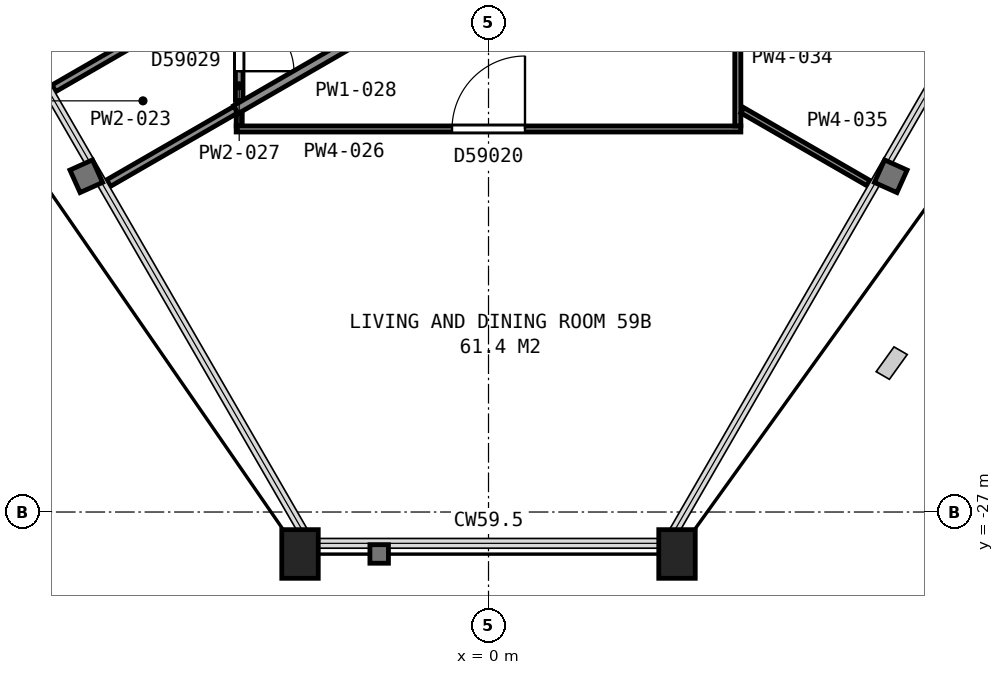
"""IFC4 building model, lengths in metres.
Left out: names, types, materials, properties, quantities, classifications, styles, units other than length and angle.
Written with IfcOpenShell. Run it as: python <this file> out.ifc"""

import sys

from ifc_helpers import new_model, si_unit, direction, frame, frame_2d, origin, origin_2d, place, context, subcontext, project, spatial, rectangle, hollow_rectangle, extrude, element, fill, save


model = new_model("IFC4")
c1 = context("Model", 3, precision=1e-05, world=origin(), true_north=direction((0.0, 1.0)))
c2 = subcontext(c1, "Body", "Model", "MODEL_VIEW")
j1 = project(units=[si_unit("LENGTHUNIT", "METRE"), si_unit("PLANEANGLEUNIT", "RADIAN")], contexts=[c1])
p1 = place(None, origin())
s1 = spatial("IfcSite", under=j1, at=p1, CompositionType="ELEMENT")
p2 = place(p1, origin())
s2 = spatial("IfcBuilding", under=s1, at=p2, CompositionType="ELEMENT")
p3 = place(p2, frame((0.0, 0.0, 236.0)))
s3 = spatial("IfcBuildingStorey", under=s2, at=p3, CompositionType="ELEMENT", Elevation=236.0)
for number, where, z_axis, x_axis in (
    (1, (-3.1, -27.69, 0.065), (0.0, 0.0, 1.0), (-1.0, 0.0, 0.0)),
    (2, (3.1, -27.69, 0.065), (0.0, 0.0, 1.0), (-1.0, 0.0, 0.0)),
):
    element("IfcColumn", number, at=place(p3, frame(where, z_axis=z_axis, x_axis=x_axis)), inside=s3, PredefinedType="COLUMN", context=c2, shape_type="SweptSolid", body=[
        extrude(hollow_rectangle(XDim=0.6, YDim=0.8, WallThickness=0.05, at=origin_2d()), origin(), (0.0, 0.0, 1.0), 3.635),
    ])
p4 = place(p3, frame((-7.148, -20.031, 0.0), z_axis=(0.0, 0.0, 1.0), x_axis=(0.865978603381, 0.500081051916, 0.0)))
e3 = element("IfcWall", 3, at=p4, inside=s3, PredefinedType="PARTITIONING", context=c2, shape_type="SweptSolid", body=[
    extrude(rectangle(XDim=3.477, YDim=0.125, at=frame_2d((1.739, 0.0))), origin(), (0.0, 0.0, 1.0), 2.713),
])
p5 = place(p3, frame((-6.248, -21.59, 0.0), z_axis=(0.0, 0.0, 1.0), x_axis=(0.866059450854, 0.499941024108, 0.0)))
e4 = element("IfcWall", 4, at=p5, inside=s3, PredefinedType="PARTITIONING", context=c2, shape_type="SweptSolid", body=[
    extrude(rectangle(XDim=2.417, YDim=0.125, at=frame_2d((1.208, 0.0))), origin(), (0.0, 0.0, 1.0), 2.713),
])
p6 = place(p3, frame((-4.1, -20.65, 0.0), z_axis=(0.0, 0.0, 1.0), x_axis=(0.0, 1.0, 0.0)))
e5 = element("IfcWall", 5, at=p6, inside=s3, PredefinedType="PARTITIONING", context=c2, shape_type="SweptSolid", body=[
    extrude(rectangle(XDim=0.2, YDim=0.1, at=frame_2d((0.1, 0.0))), origin(), (0.0, 0.0, 1.0), 2.713),
])
p7 = place(p3, frame((4.15, -20.7, 0.0), z_axis=(0.0, 0.0, 1.0), x_axis=(-1.0, 0.0, 0.0)))
e6 = element("IfcWall", 6, at=p7, inside=s3, PredefinedType="PARTITIONING", context=c2, shape_type="SweptSolid", body=[
    extrude(rectangle(XDim=8.3, YDim=0.1, at=frame_2d((4.15, 0.0))), origin(), (0.0, 0.0, 1.0), 2.713),
])
p8 = place(p7, frame((3.55, 0.0, 0.0)))
e7 = element("IfcOpeningElement", 7, at=p8, cuts=e6, PredefinedType="OPENING", context=c2, shape_type="SweptSolid", body=[
    extrude(rectangle(XDim=1.2, YDim=2.1, at=frame_2d((0.6, 1.05))), frame((0.0, 0.06, 0.0), z_axis=(0.0, -1.0, 0.0), x_axis=(1.0, 0.0, 0.0)), (0.0, 0.0, 1.0), 0.12),
])
p9 = place(p3, frame((-4.1, -18.376, 0.0), z_axis=(0.0, 0.0, 1.0), x_axis=(0.0, -1.0, 0.0)))
e8 = element("IfcWall", 8, at=p9, inside=s3, PredefinedType="PARTITIONING", context=c2, shape_type="SweptSolid", body=[
    extrude(rectangle(XDim=1.854, YDim=0.125, at=frame_2d((0.927, 0.0))), origin(), (0.0, 0.0, 1.0), 2.713),
])
p10 = place(p9, frame((0.474, 0.0, 0.0)))
e9 = element("IfcOpeningElement", 9, at=p10, cuts=e8, PredefinedType="OPENING", context=c2, shape_type="SweptSolid", body=[
    extrude(rectangle(XDim=0.9, YDim=2.1, at=frame_2d((0.45, 1.05))), frame((0.0, 0.073, 0.0), z_axis=(0.0, -1.0, 0.0), x_axis=(1.0, 0.0, 0.0)), (0.0, 0.0, 1.0), 0.145),
])
p11 = place(p3, frame((-4.154, -20.381, 0.0), z_axis=(0.0, 0.0, 1.0), x_axis=(0.86594123094, 0.500145763311, 0.0)))
e10 = element("IfcWall", 10, at=p11, inside=s3, PredefinedType="PARTITIONING", context=c2, shape_type="SweptSolid", body=[
    extrude(rectangle(XDim=2.962, YDim=0.15, at=frame_2d((1.481, 0.0))), origin(), (0.0, 0.0, 1.0), 2.713),
])
p12 = place(p3, frame((4.1, -15.539, 0.0), z_axis=(0.0, 0.0, 1.0), x_axis=(0.0, -1.0, 0.0)))
e11 = element("IfcWall", 11, at=p12, inside=s3, PredefinedType="PARTITIONING", context=c2, shape_type="SweptSolid", body=[
    extrude(rectangle(XDim=5.111, YDim=0.1, at=frame_2d((2.555, 0.0))), origin(), (0.0, 0.0, 1.0), 2.713),
])
p13 = place(p12, frame((1.961, 0.0, 0.0)))
e12 = element("IfcOpeningElement", 12, at=p13, cuts=e11, PredefinedType="OPENING", context=c2, shape_type="SweptSolid", body=[
    extrude(rectangle(XDim=0.9, YDim=2.1, at=frame_2d((0.45, 1.05))), frame((0.0, 0.06, 0.0), z_axis=(0.0, -1.0, 0.0), x_axis=(1.0, 0.0, 0.0)), (0.0, 0.0, 1.0), 0.12),
])
p14 = place(p3, frame((4.175, -20.393, 0.0), z_axis=(0.0, 0.0, 1.0), x_axis=(0.866030989016, -0.499990325971, 0.0)))
e13 = element("IfcWall", 13, at=p14, inside=s3, PredefinedType="PARTITIONING", context=c2, shape_type="SweptSolid", body=[
    extrude(rectangle(XDim=2.393, YDim=0.1, at=frame_2d((1.197, 0.0))), origin(), (0.0, 0.0, 1.0), 2.713),
])
p15 = place(p8, origin())
e14 = element("IfcDoor", 14, at=p15, inside=s3, OperationType="SINGLE_SWING_LEFT", PredefinedType="DOOR", context=c2, shape_type="SweptSolid", body=[
    extrude(rectangle(XDim=1.2, YDim=2.1, at=frame_2d((0.6, 1.05))), frame((0.0, 0.025, 0.0), z_axis=(0.0, -1.0, 0.0), x_axis=(1.0, 0.0, 0.0)), (0.0, 0.0, 1.0), 0.05),
])
fill(e7, e14)
p16 = place(p10, origin())
e15 = element("IfcDoor", 15, at=p16, inside=s3, OperationType="SINGLE_SWING_RIGHT", PredefinedType="DOOR", context=c2, shape_type="SweptSolid", body=[
    extrude(rectangle(XDim=0.9, YDim=2.1, at=frame_2d((0.45, 1.05))), frame((0.0, 0.025, 0.0), z_axis=(0.0, -1.0, 0.0), x_axis=(1.0, 0.0, 0.0)), (0.0, 0.0, 1.0), 0.05),
])
fill(e9, e15)
save(model, sys.argv[1])
